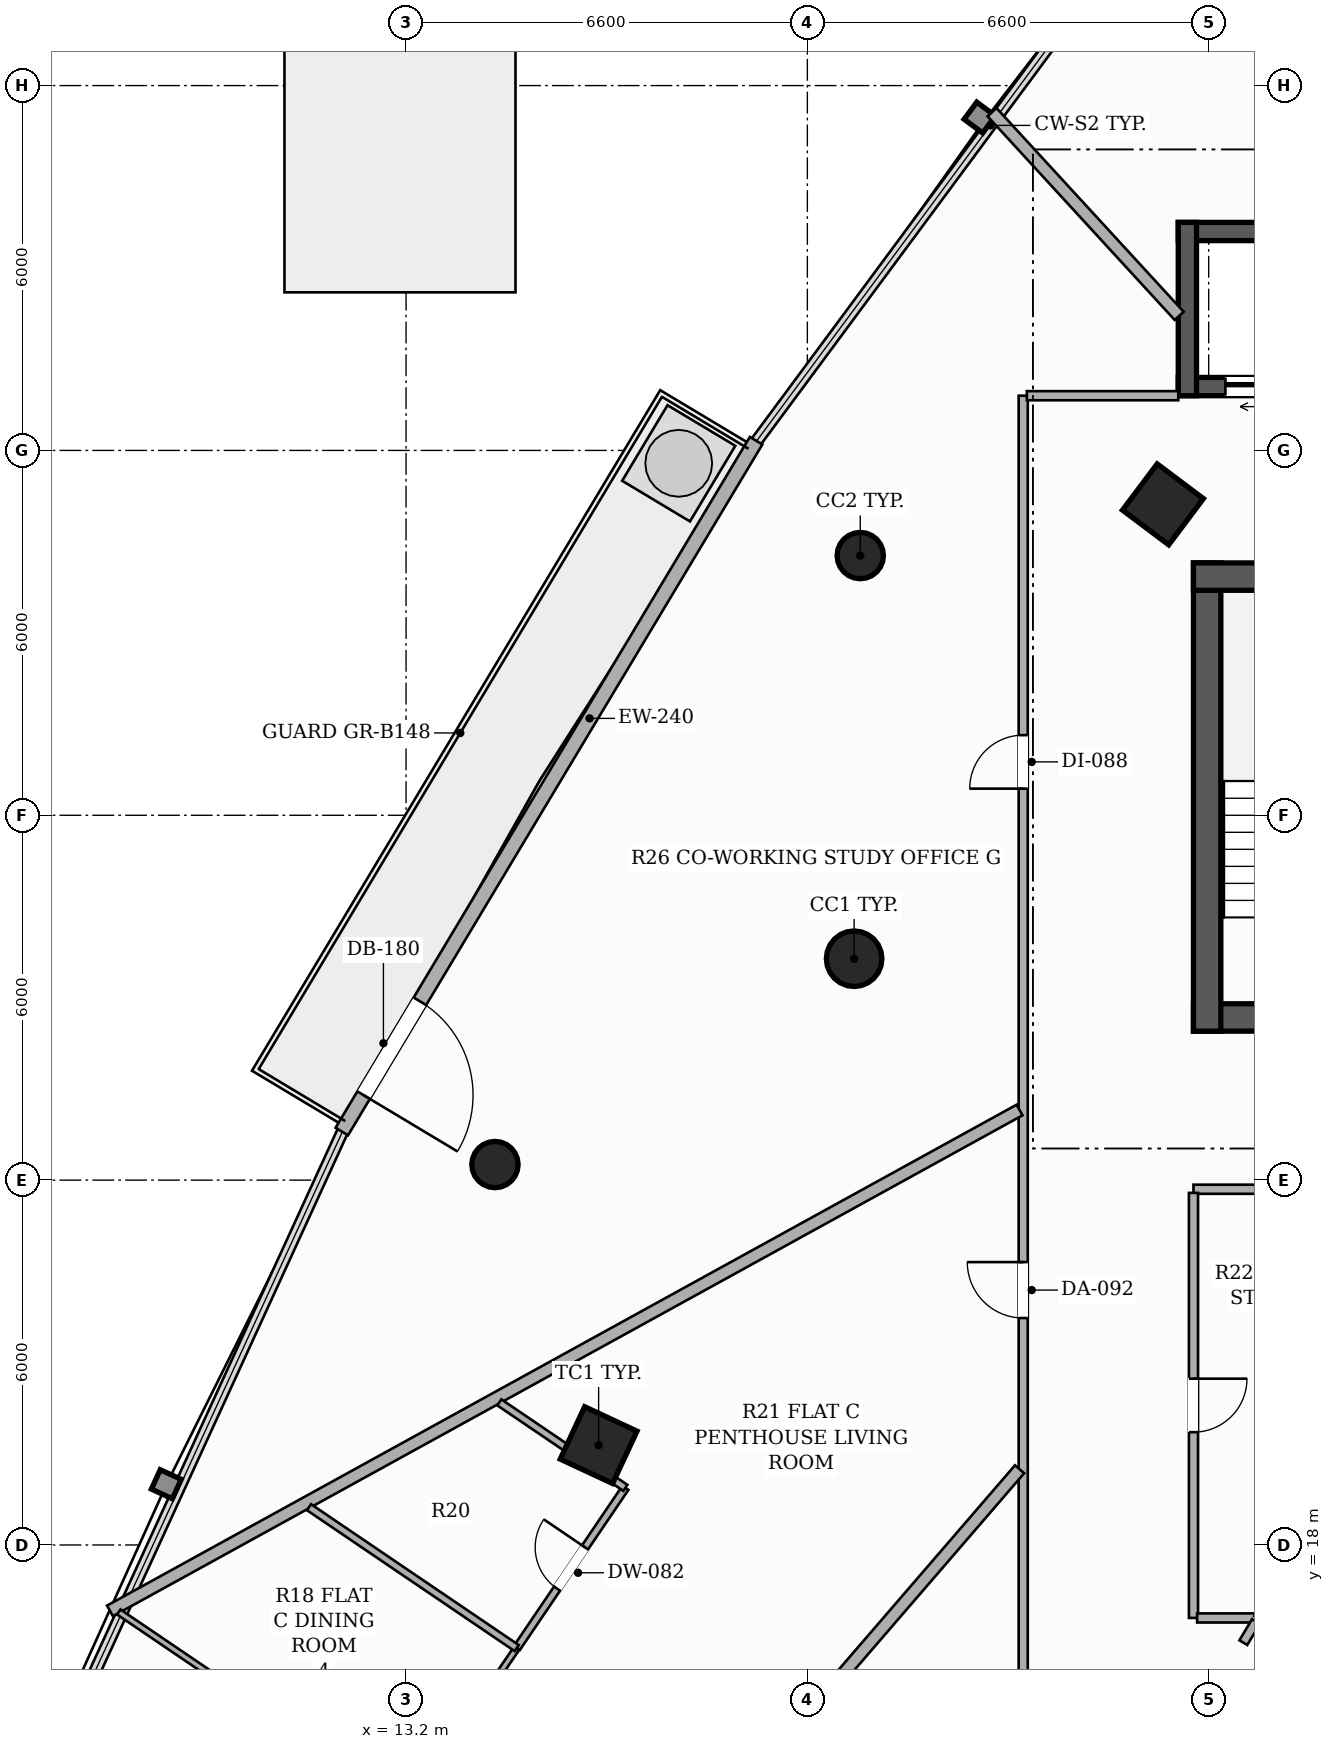
"""IFC4 building model, lengths in metres.
Left out: names, types, materials, properties, quantities, classifications, styles, units other than length and angle.
Written with IfcOpenShell. Run it as: python <this file> out.ifc"""

import sys

from ifc_helpers import new_model, si_unit, direction, frame, frame_2d, origin, origin_2d, place, context, subcontext, project, spatial, rectangle, hollow_rectangle, hollow_circle, extrude, element, fill, save


model = new_model("IFC4")
c1 = context("Model", 3, precision=1e-05, world=origin(), true_north=direction((0.0, 1.0)))
c2 = subcontext(c1, "Body", "Model", "MODEL_VIEW")
j1 = project(units=[si_unit("LENGTHUNIT", "METRE"), si_unit("PLANEANGLEUNIT", "RADIAN")], contexts=[c1])
p1 = place(None, origin())
s1 = spatial("IfcSite", under=j1, at=p1, CompositionType="ELEMENT")
p2 = place(p1, origin())
s2 = spatial("IfcBuilding", under=s1, at=p2, CompositionType="ELEMENT")
p3 = place(p2, frame((0.0, 0.0, 26.9)))
s3 = spatial("IfcBuildingStorey", under=s2, at=p3, CompositionType="ELEMENT", Elevation=26.9)
p4 = place(p3, frame((26.15, 26.675, 0.0), z_axis=(0.0, 0.0, 1.0), x_axis=(1.0, 0.0, 0.0)))
e1 = element("IfcWall", 1, at=p4, inside=s3, PredefinedType="SHEAR", context=c2, shape_type="SweptSolid", body=[
    extrude(rectangle(XDim=13.7, YDim=0.45, at=frame_2d((6.85, 0.0))), origin(), (0.0, 0.0, 1.0), 3.3),
])
p5 = place(p4, frame((4.35, 0.0, 0.0)))
e2 = element("IfcOpeningElement", 2, at=p5, cuts=e1, PredefinedType="OPENING", context=c2, shape_type="SweptSolid", body=[
    extrude(rectangle(XDim=1.05, YDim=2.15, at=frame_2d((0.525, 1.075))), frame((0.0, 0.235, 0.0), z_axis=(0.0, -1.0, 0.0), x_axis=(1.0, 0.0, 0.0)), (0.0, 0.0, 1.0), 0.47),
])
p6 = place(p4, frame((8.3, 0.0, 0.0)))
e3 = element("IfcOpeningElement", 3, at=p6, cuts=e1, PredefinedType="OPENING", context=c2, shape_type="SweptSolid", body=[
    extrude(rectangle(XDim=1.05, YDim=2.15, at=frame_2d((0.525, 1.075))), frame((0.0, 0.235, 0.0), z_axis=(0.0, -1.0, 0.0), x_axis=(1.0, 0.0, 0.0)), (0.0, 0.0, 1.0), 0.47),
])
p7 = place(p3, frame((26.375, 26.45, 0.0), z_axis=(0.0, 0.0, 1.0), x_axis=(0.0, 1.0, 0.0)))
e4 = element("IfcWall", 4, at=p7, inside=s3, PredefinedType="SHEAR", context=c2, shape_type="SweptSolid", body=[
    extrude(rectangle(XDim=7.7, YDim=0.45, at=frame_2d((3.85, 0.0))), origin(), (0.0, 0.0, 1.0), 3.3),
])
p8 = place(p3, frame((26.15, 33.925, 0.0), z_axis=(0.0, 0.0, 1.0), x_axis=(1.0, 0.0, 0.0)))
e5 = element("IfcWall", 5, at=p8, inside=s3, PredefinedType="SHEAR", context=c2, shape_type="SweptSolid", body=[
    extrude(rectangle(XDim=3.75, YDim=0.45, at=frame_2d((1.875, 0.0))), origin(), (0.0, 0.0, 1.0), 3.3),
])
p9 = place(p3, frame((40.1, 37.05, 0.0), z_axis=(0.0, 0.0, 1.0), x_axis=(-1.0, 0.0, 0.0)))
e6 = element("IfcWall", 6, at=p9, inside=s3, PredefinedType="SHEAR", context=c2, shape_type="SweptSolid", body=[
    extrude(rectangle(XDim=14.2, YDim=0.3, at=frame_2d((7.1, 0.0))), origin(), (0.0, 0.0, 1.0), 3.3),
])
p10 = place(p9, frame((12.325, 0.0, 0.0)))
e7 = element("IfcOpeningElement", 7, at=p10, cuts=e6, PredefinedType="OPENING", context=c2, shape_type="SweptSolid", body=[
    extrude(rectangle(XDim=1.1, YDim=2.2, at=frame_2d((0.55, 1.1))), frame((0.0, 0.16, 0.0), z_axis=(0.0, -1.0, 0.0), x_axis=(1.0, 0.0, 0.0)), (0.0, 0.0, 1.0), 0.32),
])
p11 = place(p9, frame((0.775, 0.0, 0.0)))
e8 = element("IfcOpeningElement", 8, at=p11, cuts=e6, PredefinedType="OPENING", context=c2, shape_type="SweptSolid", body=[
    extrude(rectangle(XDim=1.1, YDim=2.2, at=frame_2d((0.55, 1.1))), frame((0.0, 0.16, 0.0), z_axis=(0.0, -1.0, 0.0), x_axis=(1.0, 0.0, 0.0)), (0.0, 0.0, 1.0), 0.32),
])
p12 = place(p3, frame((25.9, 39.6, 0.0), z_axis=(0.0, 0.0, 1.0), x_axis=(1.0, 0.0, 0.0)))
e9 = element("IfcWall", 9, at=p12, inside=s3, PredefinedType="SHEAR", context=c2, shape_type="SweptSolid", body=[
    extrude(rectangle(XDim=14.2, YDim=0.3, at=frame_2d((7.1, 0.0))), origin(), (0.0, 0.0, 1.0), 3.3),
])
p13 = place(p3, frame((26.05, 36.9, 0.0), z_axis=(0.0, 0.0, 1.0), x_axis=(0.0, 1.0, 0.0)))
e10 = element("IfcWall", 10, at=p13, inside=s3, PredefinedType="SHEAR", context=c2, shape_type="SweptSolid", body=[
    extrude(rectangle(XDim=2.85, YDim=0.3, at=frame_2d((1.425, 0.0))), origin(), (0.0, 0.0, 1.0), 3.3),
])
p14 = place(p3, frame((25.648, 35.113, 0.0), z_axis=(0.0, 0.0, 1.0), x_axis=(0.600420225326, 0.799684658487, 0.0)))
e11 = element("IfcColumn", 11, at=p14, inside=s3, PredefinedType="COLUMN", context=c2, shape_type="SweptSolid", body=[
    extrude(hollow_rectangle(XDim=0.95, YDim=0.95, WallThickness=0.032, at=origin_2d()), origin(), (0.0, 0.0, 1.0), 3.3),
])
p15 = place(p3, frame((20.569, 27.641, 0.0), z_axis=(0.0, 0.0, 1.0), x_axis=(1.0, 0.0, 0.0)))
e12 = element("IfcColumn", 12, at=p15, inside=s3, PredefinedType="COLUMN", context=c2, shape_type="SweptSolid", body=[
    extrude(hollow_circle(Radius=0.457, WallThickness=0.025, at=origin_2d()), origin(), (0.0, 0.0, 1.0), 3.3),
])
p16 = place(p3, frame((16.367, 19.642, 0.0), z_axis=(0.0, 0.0, 1.0), x_axis=(0.422618261741, 0.906307787037, 0.0)))
e13 = element("IfcColumn", 13, at=p16, inside=s3, PredefinedType="COLUMN", context=c2, shape_type="SweptSolid", body=[
    extrude(hollow_rectangle(XDim=0.95, YDim=0.95, WallThickness=0.032, at=origin_2d()), origin(), (0.0, 0.0, 1.0), 3.3),
])
for number, where, z_axis, x_axis in (
    (14, (20.67, 34.271, 0.0), (0.0, 0.0, 1.0), (1.0, 0.0, 0.0)),
    (15, (14.662, 24.256, 0.0), (0.0, 0.0, 1.0), (1.0, 0.0, 0.0)),
):
    element("IfcColumn", number, at=place(p3, frame(where, z_axis=z_axis, x_axis=x_axis)), inside=s3, PredefinedType="COLUMN", context=c2, shape_type="SweptSolid", body=[
        extrude(hollow_circle(Radius=0.381, WallThickness=0.022, at=origin_2d()), origin(), (0.0, 0.0, 1.0), 3.3),
    ])
p17 = place(p3, frame((18.957, 36.16, 0.0), z_axis=(0.0, 0.0, 1.0), x_axis=(-0.51435482044, -0.857577470955, 0.0)))
e16 = element("IfcWall", 16, at=p17, inside=s3, PredefinedType="SOLIDWALL", context=c2, shape_type="SweptSolid", body=[
    extrude(rectangle(XDim=13.248, YDim=0.24, at=frame_2d((6.624, 0.0))), origin(), (0.0, 0.0, 1.0), 2.624),
])
p18 = place(p17, frame((10.75, 0.0, 0.0)))
e17 = element("IfcOpeningElement", 17, at=p18, cuts=e16, PredefinedType="OPENING", context=c2, shape_type="SweptSolid", body=[
    extrude(rectangle(XDim=1.8, YDim=2.2, at=frame_2d((0.9, 1.1))), frame((0.0, 0.13, 0.0), z_axis=(0.0, -1.0, 0.0), x_axis=(1.0, 0.0, 0.0)), (0.0, 0.0, 1.0), 0.26),
])
p19 = place(p3, frame((23.35, 11.86, 0.0), z_axis=(0.0, 0.0, 1.0), x_axis=(0.0, 1.0, 0.0)))
e18 = element("IfcWall", 18, at=p19, inside=s3, PredefinedType="PARTITIONING", context=c2, shape_type="SweptSolid", body=[
    extrude(rectangle(XDim=25.04, YDim=0.15, at=frame_2d((12.52, 0.0))), origin(), (0.0, 0.0, 1.0), 2.413),
])
p20 = place(p19, frame((9.872, 0.0, 0.0)))
e19 = element("IfcOpeningElement", 19, at=p20, cuts=e18, PredefinedType="OPENING", context=c2, shape_type="SweptSolid", body=[
    extrude(rectangle(XDim=0.92, YDim=2.15, at=frame_2d((0.46, 1.075))), frame((0.0, 0.085, 0.0), z_axis=(0.0, -1.0, 0.0), x_axis=(1.0, 0.0, 0.0)), (0.0, 0.0, 1.0), 0.17),
])
p21 = place(p19, frame((18.578, 0.0, 0.0)))
e20 = element("IfcOpeningElement", 20, at=p21, cuts=e18, PredefinedType="OPENING", context=c2, shape_type="SweptSolid", body=[
    extrude(rectangle(XDim=0.88, YDim=2.1, at=frame_2d((0.44, 1.05))), frame((0.0, 0.085, 0.0), z_axis=(0.0, -1.0, 0.0), x_axis=(1.0, 0.0, 0.0)), (0.0, 0.0, 1.0), 0.17),
])
p22 = place(p3, frame((23.41, 36.9, 0.0), z_axis=(0.0, 0.0, 1.0), x_axis=(1.0, 0.0, 0.0)))
e21 = element("IfcWall", 21, at=p22, inside=s3, PredefinedType="PARTITIONING", context=c2, shape_type="SweptSolid", body=[
    extrude(rectangle(XDim=2.49, YDim=0.15, at=frame_2d((1.245, 0.0))), origin(), (0.0, 0.0, 1.0), 2.413),
])
p23 = place(p3, frame((31.523, 23.85, 0.0), z_axis=(0.0, 0.0, 1.0), x_axis=(-1.0, 0.0, 0.0)))
e22 = element("IfcWall", 22, at=p23, inside=s3, PredefinedType="PARTITIONING", context=c2, shape_type="SweptSolid", body=[
    extrude(rectangle(XDim=5.373, YDim=0.15, at=frame_2d((2.687, 0.0))), origin(), (0.0, 0.0, 1.0), 2.669),
])
p24 = place(p3, frame((26.15, 23.79, 0.0), z_axis=(0.0, 0.0, 1.0), x_axis=(0.0, -1.0, 0.0)))
e23 = element("IfcWall", 23, at=p24, inside=s3, PredefinedType="PARTITIONING", context=c2, shape_type="SweptSolid", body=[
    extrude(rectangle(XDim=6.99, YDim=0.15, at=frame_2d((3.495, 0.0))), origin(), (0.0, 0.0, 1.0), 2.669),
])
p25 = place(p24, frame((3.055, 0.0, 0.0)))
e24 = element("IfcOpeningElement", 24, at=p25, cuts=e23, PredefinedType="OPENING", context=c2, shape_type="SweptSolid", body=[
    extrude(rectangle(XDim=0.88, YDim=2.1, at=frame_2d((0.44, 1.05))), frame((0.0, 0.085, 0.0), z_axis=(0.0, -1.0, 0.0), x_axis=(1.0, 0.0, 0.0)), (0.0, 0.0, 1.0), 0.17),
])
p26 = place(p3, frame((26.21, 16.8, 0.0), z_axis=(0.0, 0.0, 1.0), x_axis=(1.0, 0.0, 0.0)))
e25 = element("IfcWall", 25, at=p26, inside=s3, PredefinedType="PARTITIONING", context=c2, shape_type="SweptSolid", body=[
    extrude(rectangle(XDim=1.003, YDim=0.15, at=frame_2d((0.501, 0.0))), origin(), (0.0, 0.0, 1.0), 3.06),
])
p27 = place(p3, frame((27.177, 16.74, 0.0), z_axis=(0.0, 0.0, 1.0), x_axis=(-0.513515835534, -0.858080116688, 0.0)))
e26 = element("IfcWall", 26, at=p27, inside=s3, PredefinedType="PARTITIONING", context=c2, shape_type="SweptSolid", body=[
    extrude(rectangle(XDim=0.403, YDim=0.15, at=frame_2d((0.202, 0.0))), origin(), (0.0, 0.0, 1.0), 3.06),
])
p28 = place(p3, frame((27.213, 16.791, 0.0), z_axis=(0.0, 0.0, 1.0), x_axis=(0.521095914239, 0.853498124288, 0.0)))
e27 = element("IfcWall", 27, at=p28, inside=s3, PredefinedType="PARTITIONING", context=c2, shape_type="SweptSolid", body=[
    extrude(rectangle(XDim=8.2, YDim=0.15, at=frame_2d((4.1, 0.0))), origin(), (0.0, 0.0, 1.0), 2.669),
])
p29 = place(p3, frame((9.24, 2.959, 0.0), z_axis=(0.0, 0.0, 1.0), x_axis=(0.653213734957, 0.757173570896, 0.0)))
e28 = element("IfcWall", 28, at=p29, inside=s3, PredefinedType="PARTITIONING", context=c2, shape_type="SweptSolid", body=[
    extrude(rectangle(XDim=21.509, YDim=0.2, at=frame_2d((10.754, 0.0))), origin(), (0.0, 0.0, 1.0), 2.413),
])
p30 = place(p3, frame((25.915, 38.213, 0.0), z_axis=(0.0, 0.0, 1.0), x_axis=(-0.676584398078, 0.736365094418, 0.0)))
e29 = element("IfcWall", 29, at=p30, inside=s3, PredefinedType="PARTITIONING", context=c2, shape_type="SweptSolid", body=[
    extrude(rectangle(XDim=4.55, YDim=0.2, at=frame_2d((2.275, 0.0))), origin(), (0.0, 0.0, 1.0), 2.619),
])
p31 = place(p3, frame((8.331, 16.916, 0.0), z_axis=(0.0, 0.0, 1.0), x_axis=(0.875977946948, 0.482351154721, 0.0)))
e30 = element("IfcWall", 30, at=p31, inside=s3, PredefinedType="PARTITIONING", context=c2, shape_type="SweptSolid", body=[
    extrude(rectangle(XDim=17.077, YDim=0.2, at=frame_2d((8.539, 0.0))), origin(), (0.0, 0.0, 1.0), 2.413),
])
p32 = place(p3, frame((15.02, 16.304, 0.0), z_axis=(0.0, 0.0, 1.0), x_axis=(0.561248235284, 0.827647520621, 0.0)))
e31 = element("IfcWall", 31, at=p32, inside=s3, PredefinedType="PARTITIONING", context=c2, shape_type="SweptSolid", body=[
    extrude(rectangle(XDim=3.184, YDim=0.12, at=frame_2d((1.592, 0.0))), origin(), (0.0, 0.0, 1.0), 2.669),
])
p33 = place(p32, frame((1.182, 0.0, 0.0)))
e32 = element("IfcOpeningElement", 32, at=p33, cuts=e31, PredefinedType="OPENING", context=c2, shape_type="SweptSolid", body=[
    extrude(rectangle(XDim=0.82, YDim=2.1, at=frame_2d((0.41, 1.05))), frame((0.0, 0.07, 0.0), z_axis=(0.0, -1.0, 0.0), x_axis=(1.0, 0.0, 0.0)), (0.0, 0.0, 1.0), 0.14),
])
p34 = place(p3, frame((16.807, 18.939, 0.0), z_axis=(0.0, 0.0, 1.0), x_axis=(-0.82760029168, 0.561317875372, 0.0)))
e33 = element("IfcWall", 33, at=p34, inside=s3, PredefinedType="PARTITIONING", context=c2, shape_type="SweptSolid", body=[
    extrude(rectangle(XDim=2.505, YDim=0.12, at=frame_2d((1.252, 0.0))), origin(), (0.0, 0.0, 1.0), 2.413),
])
p35 = place(p3, frame((13.233, 13.67, 0.0), z_axis=(0.0, 0.0, 1.0), x_axis=(0.561443272398, 0.827515227582, 0.0)))
e34 = element("IfcWall", 34, at=p35, inside=s3, PredefinedType="PARTITIONING", context=c2, shape_type="SweptSolid", body=[
    extrude(rectangle(XDim=3.183, YDim=0.1, at=frame_2d((1.592, 0.0))), origin(), (0.0, 0.0, 1.0), 3.06),
])
p36 = place(p35, frame((1.151, 0.0, 0.0)))
e35 = element("IfcOpeningElement", 35, at=p36, cuts=e34, PredefinedType="OPENING", context=c2, shape_type="SweptSolid", body=[
    extrude(rectangle(XDim=0.88, YDim=2.1, at=frame_2d((0.44, 1.05))), frame((0.0, 0.06, 0.0), z_axis=(0.0, -1.0, 0.0), x_axis=(1.0, 0.0, 0.0)), (0.0, 0.0, 1.0), 0.12),
])
p37 = place(p3, frame((15.02, 16.304, 0.0), z_axis=(0.0, 0.0, 1.0), x_axis=(-0.827573908317, 0.561356772715, 0.0)))
e36 = element("IfcWall", 36, at=p37, inside=s3, PredefinedType="PARTITIONING", context=c2, shape_type="SweptSolid", body=[
    extrude(rectangle(XDim=4.128, YDim=0.12, at=frame_2d((2.064, 0.0))), origin(), (0.0, 0.0, 1.0), 2.413),
])
p38 = place(p3, frame((8.475, 16.898, 0.0), z_axis=(0.0, 0.0, 1.0), x_axis=(0.827515231239, -0.561443267007, 0.0)))
e37 = element("IfcWall", 37, at=p38, inside=s3, PredefinedType="PARTITIONING", context=c2, shape_type="SweptSolid", body=[
    extrude(rectangle(XDim=5.75, YDim=0.1, at=frame_2d((2.875, 0.0))), origin(), (0.0, 0.0, 1.0), 2.413),
])
p39 = place(p18, origin())
e38 = element("IfcDoor", 38, at=p39, inside=s3, OperationType="SINGLE_SWING_RIGHT", PredefinedType="DOOR", context=c2, shape_type="SweptSolid", body=[
    extrude(rectangle(XDim=1.8, YDim=2.2, at=frame_2d((0.9, 1.1))), frame((0.0, 0.025, 0.0), z_axis=(0.0, -1.0, 0.0), x_axis=(1.0, 0.0, 0.0)), (0.0, 0.0, 1.0), 0.05),
])
fill(e17, e38)
p40 = place(p10, origin())
e39 = element("IfcDoor", 39, at=p40, inside=s3, OperationType="DOUBLE_DOOR_SLIDING", PredefinedType="DOOR", context=c2, shape_type="SweptSolid", body=[
    extrude(rectangle(XDim=1.1, YDim=2.2, at=frame_2d((0.55, 1.1))), frame((0.0, 0.025, 0.0), z_axis=(0.0, -1.0, 0.0), x_axis=(1.0, 0.0, 0.0)), (0.0, 0.0, 1.0), 0.05),
])
fill(e7, e39)
p41 = place(p20, origin())
e40 = element("IfcDoor", 40, at=p41, inside=s3, OperationType="SINGLE_SWING_RIGHT", PredefinedType="DOOR", context=c2, shape_type="SweptSolid", body=[
    extrude(rectangle(XDim=0.92, YDim=2.15, at=frame_2d((0.46, 1.075))), frame((0.0, 0.025, 0.0), z_axis=(0.0, -1.0, 0.0), x_axis=(1.0, 0.0, 0.0)), (0.0, 0.0, 1.0), 0.05),
])
fill(e19, e40)
p42 = place(p33, origin())
e41 = element("IfcDoor", 41, at=p42, inside=s3, OperationType="SINGLE_SWING_RIGHT", PredefinedType="DOOR", context=c2, shape_type="SweptSolid", body=[
    extrude(rectangle(XDim=0.82, YDim=2.1, at=frame_2d((0.41, 1.05))), frame((0.0, 0.025, 0.0), z_axis=(0.0, -1.0, 0.0), x_axis=(1.0, 0.0, 0.0)), (0.0, 0.0, 1.0), 0.05),
])
fill(e32, e41)
p43 = place(p21, origin())
e42 = element("IfcDoor", 42, at=p43, inside=s3, OperationType="SINGLE_SWING_LEFT", PredefinedType="DOOR", context=c2, shape_type="SweptSolid", body=[
    extrude(rectangle(XDim=0.88, YDim=2.1, at=frame_2d((0.44, 1.05))), frame((0.0, 0.025, 0.0), z_axis=(0.0, -1.0, 0.0), x_axis=(1.0, 0.0, 0.0)), (0.0, 0.0, 1.0), 0.05),
])
fill(e20, e42)
p44 = place(p25, origin())
e43 = element("IfcDoor", 43, at=p44, inside=s3, OperationType="SINGLE_SWING_LEFT", PredefinedType="DOOR", context=c2, shape_type="SweptSolid", body=[
    extrude(rectangle(XDim=0.88, YDim=2.1, at=frame_2d((0.44, 1.05))), frame((0.0, 0.025, 0.0), z_axis=(0.0, -1.0, 0.0), x_axis=(1.0, 0.0, 0.0)), (0.0, 0.0, 1.0), 0.05),
])
fill(e24, e43)
save(model, sys.argv[1])
